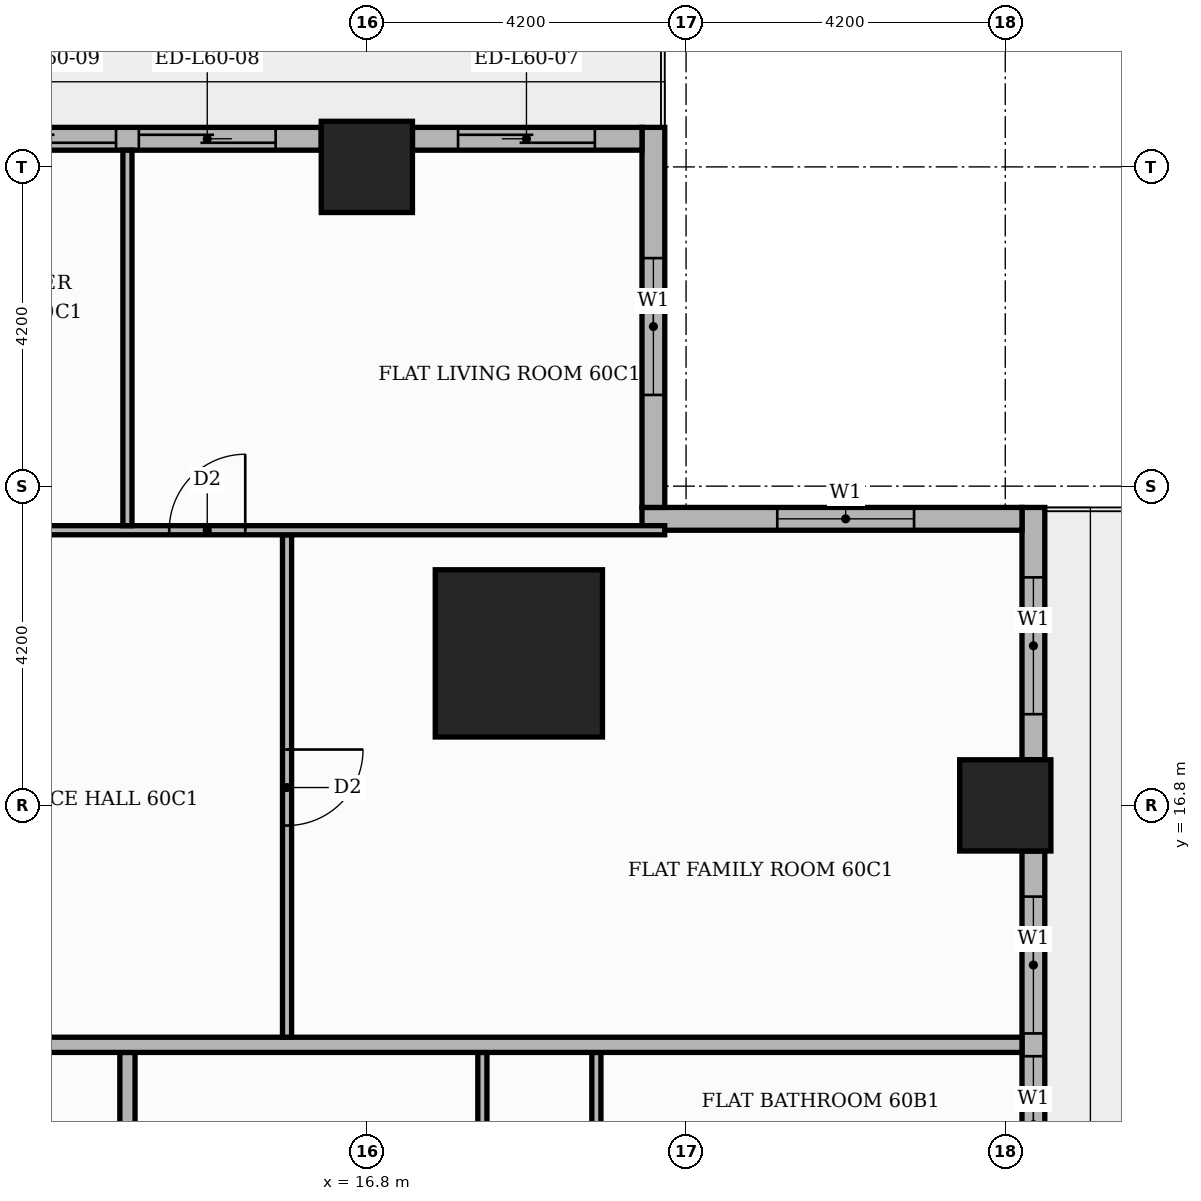
"""IFC4 building model, lengths in metres.
Left out: names, types, materials, properties, quantities, classifications, styles, units other than length and angle.
Written with IfcOpenShell. Run it as: python <this file> out.ifc"""

import sys

from ifc_helpers import new_model, si_unit, direction, frame, frame_2d, origin, origin_2d, place, context, subcontext, project, spatial, rectangle, extrude, element, fill, save


model = new_model("IFC4")
c1 = context("Model", 3, precision=1e-05, world=origin(), true_north=direction((0.0, 1.0)))
c2 = subcontext(c1, "Body", "Model", "MODEL_VIEW")
j1 = project(units=[si_unit("LENGTHUNIT", "METRE"), si_unit("PLANEANGLEUNIT", "RADIAN")], contexts=[c1])
p1 = place(None, origin())
s1 = spatial("IfcSite", under=j1, at=p1, CompositionType="ELEMENT")
p2 = place(p1, origin())
s2 = spatial("IfcBuilding", under=s1, at=p2, CompositionType="ELEMENT")
p3 = place(p2, frame((0.0, 0.0, 252.3)))
s3 = spatial("IfcBuildingStorey", under=s2, at=p3, CompositionType="ELEMENT", Elevation=252.3)
p4 = place(p3, frame((18.8, 18.8, 0.0), z_axis=(0.0, 0.0, 1.0), x_axis=(1.0, 0.0, 0.0)))
e1 = element("IfcColumn", 1, at=p4, inside=s3, PredefinedType="COLUMN", context=c2, shape_type="SweptSolid", body=[
    extrude(rectangle(XDim=2.2, YDim=2.2, at=origin_2d()), origin(), (0.0, 0.0, 1.0), 3.9),
])
for number, where, z_axis, x_axis in (
    (2, (25.2, 16.8, 0.0), (0.0, 0.0, 1.0), (1.0, 0.0, 0.0)),
    (3, (16.8, 25.2, 0.0), (0.0, 0.0, 1.0), (1.0, 0.0, 0.0)),
):
    element("IfcColumn", number, at=place(p3, frame(where, z_axis=z_axis, x_axis=x_axis)), inside=s3, PredefinedType="COLUMN", context=c2, shape_type="SweptSolid", body=[
        extrude(rectangle(XDim=1.2, YDim=1.2, at=origin_2d()), origin(), (0.0, 0.0, 1.0), 3.9),
    ])
p5 = place(p3, frame((25.57, 9.0, 0.0), z_axis=(0.0, 0.0, 1.0), x_axis=(0.0, 1.0, 0.0)))
e4 = element("IfcWall", 4, at=p5, inside=s3, PredefinedType="STANDARD", context=c2, shape_type="SweptSolid", body=[
    extrude(rectangle(XDim=7.2, YDim=0.3, at=frame_2d((3.6, 0.0))), origin(), (0.0, 0.0, 1.0), 3.48),
])
p6 = place(p5, frame((0.6, 0.0, 0.9)))
e5 = element("IfcOpeningElement", 5, at=p6, cuts=e4, PredefinedType="OPENING", context=c2, shape_type="SweptSolid", body=[
    extrude(rectangle(XDim=1.8, YDim=2.1, at=frame_2d((0.9, 1.05))), frame((0.0, 0.16, 0.0), z_axis=(0.0, -1.0, 0.0), x_axis=(1.0, 0.0, 0.0)), (0.0, 0.0, 1.0), 0.32),
])
p7 = place(p5, frame((2.7, 0.0, 0.9)))
e6 = element("IfcOpeningElement", 6, at=p7, cuts=e4, PredefinedType="OPENING", context=c2, shape_type="SweptSolid", body=[
    extrude(rectangle(XDim=1.8, YDim=2.1, at=frame_2d((0.9, 1.05))), frame((0.0, 0.16, 0.0), z_axis=(0.0, -1.0, 0.0), x_axis=(1.0, 0.0, 0.0)), (0.0, 0.0, 1.0), 0.32),
])
p8 = place(p5, frame((4.8, 0.0, 0.9)))
e7 = element("IfcOpeningElement", 7, at=p8, cuts=e4, PredefinedType="OPENING", context=c2, shape_type="SweptSolid", body=[
    extrude(rectangle(XDim=1.8, YDim=2.1, at=frame_2d((0.9, 1.05))), frame((0.0, 0.16, 0.0), z_axis=(0.0, -1.0, 0.0), x_axis=(1.0, 0.0, 0.0)), (0.0, 0.0, 1.0), 0.32),
])
p9 = place(p3, frame((25.57, 17.4, 0.0), z_axis=(0.0, 0.0, 1.0), x_axis=(0.0, 1.0, 0.0)))
e8 = element("IfcWall", 8, at=p9, inside=s3, PredefinedType="STANDARD", context=c2, shape_type="SweptSolid", body=[
    extrude(rectangle(XDim=3.32, YDim=0.3, at=frame_2d((1.66, 0.0))), origin(), (0.0, 0.0, 1.0), 3.48),
])
p10 = place(p9, frame((0.6, 0.0, 0.9)))
e9 = element("IfcOpeningElement", 9, at=p10, cuts=e8, PredefinedType="OPENING", context=c2, shape_type="SweptSolid", body=[
    extrude(rectangle(XDim=1.8, YDim=2.1, at=frame_2d((0.9, 1.05))), frame((0.0, 0.16, 0.0), z_axis=(0.0, -1.0, 0.0), x_axis=(1.0, 0.0, 0.0)), (0.0, 0.0, 1.0), 0.32),
])
p11 = place(p3, frame((25.42, 20.57, 0.0), z_axis=(0.0, 0.0, 1.0), x_axis=(-1.0, 0.0, 0.0)))
e10 = element("IfcWall", 10, at=p11, inside=s3, PredefinedType="STANDARD", context=c2, shape_type="SweptSolid", body=[
    extrude(rectangle(XDim=5.0, YDim=0.3, at=frame_2d((2.5, 0.0))), origin(), (0.0, 0.0, 1.0), 3.48),
])
p12 = place(p11, frame((1.42, 0.0, 0.9)))
e11 = element("IfcOpeningElement", 11, at=p12, cuts=e10, PredefinedType="OPENING", context=c2, shape_type="SweptSolid", body=[
    extrude(rectangle(XDim=1.8, YDim=2.1, at=frame_2d((0.9, 1.05))), frame((0.0, 0.16, 0.0), z_axis=(0.0, -1.0, 0.0), x_axis=(1.0, 0.0, 0.0)), (0.0, 0.0, 1.0), 0.32),
])
p13 = place(p3, frame((20.57, 20.72, 0.0), z_axis=(0.0, 0.0, 1.0), x_axis=(0.0, 1.0, 0.0)))
e12 = element("IfcWall", 12, at=p13, inside=s3, PredefinedType="STANDARD", context=c2, shape_type="SweptSolid", body=[
    extrude(rectangle(XDim=5.0, YDim=0.3, at=frame_2d((2.5, 0.0))), origin(), (0.0, 0.0, 1.0), 3.48),
])
p14 = place(p13, frame((1.48, 0.0, 0.9)))
e13 = element("IfcOpeningElement", 13, at=p14, cuts=e12, PredefinedType="OPENING", context=c2, shape_type="SweptSolid", body=[
    extrude(rectangle(XDim=1.8, YDim=2.1, at=frame_2d((0.9, 1.05))), frame((0.0, 0.16, 0.0), z_axis=(0.0, -1.0, 0.0), x_axis=(1.0, 0.0, 0.0)), (0.0, 0.0, 1.0), 0.32),
])
p15 = place(p3, frame((20.42, 25.57, 0.0), z_axis=(0.0, 0.0, 1.0), x_axis=(-1.0, 0.0, 0.0)))
e14 = element("IfcWall", 14, at=p15, inside=s3, PredefinedType="STANDARD", context=c2, shape_type="SweptSolid", body=[
    extrude(rectangle(XDim=3.02, YDim=0.3, at=frame_2d((1.51, 0.0))), origin(), (0.0, 0.0, 1.0), 3.48),
])
p16 = place(p15, frame((0.62, 0.0, 0.0)))
e15 = element("IfcOpeningElement", 15, at=p16, cuts=e14, PredefinedType="OPENING", context=c2, shape_type="SweptSolid", body=[
    extrude(rectangle(XDim=1.8, YDim=2.4, at=frame_2d((0.9, 1.2))), frame((0.0, 0.16, 0.0), z_axis=(0.0, -1.0, 0.0), x_axis=(1.0, 0.0, 0.0)), (0.0, 0.0, 1.0), 0.32),
])
p17 = place(p3, frame((16.2, 25.57, 0.0), z_axis=(0.0, 0.0, 1.0), x_axis=(-1.0, 0.0, 0.0)))
e16 = element("IfcWall", 16, at=p17, inside=s3, PredefinedType="STANDARD", context=c2, shape_type="SweptSolid", body=[
    extrude(rectangle(XDim=7.2, YDim=0.3, at=frame_2d((3.6, 0.0))), origin(), (0.0, 0.0, 1.0), 3.48),
])
p18 = place(p17, frame((0.6, 0.0, 0.0)))
e17 = element("IfcOpeningElement", 17, at=p18, cuts=e16, PredefinedType="OPENING", context=c2, shape_type="SweptSolid", body=[
    extrude(rectangle(XDim=1.8, YDim=2.4, at=frame_2d((0.9, 1.2))), frame((0.0, 0.16, 0.0), z_axis=(0.0, -1.0, 0.0), x_axis=(1.0, 0.0, 0.0)), (0.0, 0.0, 1.0), 0.32),
])
p19 = place(p17, frame((2.7, 0.0, 0.0)))
e18 = element("IfcOpeningElement", 18, at=p19, cuts=e16, PredefinedType="OPENING", context=c2, shape_type="SweptSolid", body=[
    extrude(rectangle(XDim=1.8, YDim=2.4, at=frame_2d((0.9, 1.2))), frame((0.0, 0.16, 0.0), z_axis=(0.0, -1.0, 0.0), x_axis=(1.0, 0.0, 0.0)), (0.0, 0.0, 1.0), 0.32),
])
p20 = place(p17, frame((4.8, 0.0, 0.9)))
e19 = element("IfcOpeningElement", 19, at=p20, cuts=e16, PredefinedType="OPENING", context=c2, shape_type="SweptSolid", body=[
    extrude(rectangle(XDim=1.8, YDim=2.1, at=frame_2d((0.9, 1.05))), frame((0.0, 0.16, 0.0), z_axis=(0.0, -1.0, 0.0), x_axis=(1.0, 0.0, 0.0)), (0.0, 0.0, 1.0), 0.32),
])
p21 = place(p3, frame((18.32, 9.66, 0.0), z_axis=(0.0, 0.0, 1.0), x_axis=(0.0, 1.0, 0.0)))
e20 = element("IfcWall", 20, at=p21, inside=s3, PredefinedType="PARTITIONING", context=c2, shape_type="SweptSolid", body=[
    extrude(rectangle(XDim=3.89, YDim=0.12, at=frame_2d((1.945, 0.0))), origin(), (0.0, 0.0, 1.0), 3.48),
])
p22 = place(p21, frame((1.515, 0.0, 0.0)))
e21 = element("IfcOpeningElement", 21, at=p22, cuts=e20, PredefinedType="OPENING", context=c2, shape_type="SweptSolid", body=[
    extrude(rectangle(XDim=0.9, YDim=2.1, at=frame_2d((0.45, 1.05))), frame((0.0, 0.07, 0.0), z_axis=(0.0, -1.0, 0.0), x_axis=(1.0, 0.0, 0.0)), (0.0, 0.0, 1.0), 0.14),
])
p23 = place(p3, frame((13.65, 11.1, 0.0), z_axis=(0.0, 0.0, 1.0), x_axis=(0.0, 1.0, 0.0)))
e22 = element("IfcWall", 22, at=p23, inside=s3, PredefinedType="PARTITIONING", context=c2, shape_type="SweptSolid", body=[
    extrude(rectangle(XDim=2.45, YDim=0.2, at=frame_2d((1.225, 0.0))), origin(), (0.0, 0.0, 1.0), 3.48),
])
p24 = place(p3, frame((19.82, 11.61, 0.0), z_axis=(0.0, 0.0, 1.0), x_axis=(0.0, 1.0, 0.0)))
e23 = element("IfcWall", 23, at=p24, inside=s3, PredefinedType="PARTITIONING", context=c2, shape_type="SweptSolid", body=[
    extrude(rectangle(XDim=1.94, YDim=0.12, at=frame_2d((0.97, 0.0))), origin(), (0.0, 0.0, 1.0), 3.48),
])
p25 = place(p3, frame((-13.65, 13.65, 0.0), z_axis=(0.0, 0.0, 1.0), x_axis=(1.0, 0.0, 0.0)))
e24 = element("IfcWall", 24, at=p25, inside=s3, PredefinedType="PARTITIONING", context=c2, shape_type="SweptSolid", body=[
    extrude(rectangle(XDim=39.07, YDim=0.2, at=frame_2d((19.535, 0.0))), origin(), (0.0, 0.0, 1.0), 3.48),
])
p26 = place(p25, frame((24.65, 0.0, 0.0)))
e25 = element("IfcOpeningElement", 25, at=p26, cuts=e24, PredefinedType="OPENING", context=c2, shape_type="SweptSolid", body=[
    extrude(rectangle(XDim=1.1, YDim=2.4, at=frame_2d((0.55, 1.2))), frame((0.0, 0.11, 0.0), z_axis=(0.0, -1.0, 0.0), x_axis=(1.0, 0.0, 0.0)), (0.0, 0.0, 1.0), 0.22),
])
p27 = place(p25, frame((14.15, 0.0, 0.0)))
e26 = element("IfcOpeningElement", 26, at=p27, cuts=e24, PredefinedType="OPENING", context=c2, shape_type="SweptSolid", body=[
    extrude(rectangle(XDim=1.1, YDim=2.4, at=frame_2d((0.55, 1.2))), frame((0.0, 0.11, 0.0), z_axis=(0.0, -1.0, 0.0), x_axis=(1.0, 0.0, 0.0)), (0.0, 0.0, 1.0), 0.22),
])
p28 = place(p3, frame((15.75, 13.75, 0.0), z_axis=(0.0, 0.0, 1.0), x_axis=(0.0, 1.0, 0.0)))
e27 = element("IfcWall", 27, at=p28, inside=s3, PredefinedType="PARTITIONING", context=c2, shape_type="SweptSolid", body=[
    extrude(rectangle(XDim=6.61, YDim=0.12, at=frame_2d((3.305, 0.0))), origin(), (0.0, 0.0, 1.0), 3.48),
])
p29 = place(p28, frame((2.785, 0.0, 0.0)))
e28 = element("IfcOpeningElement", 28, at=p29, cuts=e27, PredefinedType="OPENING", context=c2, shape_type="SweptSolid", body=[
    extrude(rectangle(XDim=1.0, YDim=2.1, at=frame_2d((0.5, 1.05))), frame((0.0, 0.07, 0.0), z_axis=(0.0, -1.0, 0.0), x_axis=(1.0, 0.0, 0.0)), (0.0, 0.0, 1.0), 0.14),
])
p30 = place(p3, frame((5.35, 20.42, 0.0), z_axis=(0.0, 0.0, 1.0), x_axis=(1.0, 0.0, 0.0)))
e29 = element("IfcWall", 29, at=p30, inside=s3, PredefinedType="PARTITIONING", context=c2, shape_type="SweptSolid", body=[
    extrude(rectangle(XDim=15.369, YDim=0.12, at=frame_2d((7.685, 0.0))), origin(), (0.0, 0.0, 1.0), 3.48),
])
p31 = place(p30, frame((8.85, 0.0, 0.0)))
e30 = element("IfcOpeningElement", 30, at=p31, cuts=e29, PredefinedType="OPENING", context=c2, shape_type="SweptSolid", body=[
    extrude(rectangle(XDim=1.0, YDim=2.1, at=frame_2d((0.5, 1.05))), frame((0.0, 0.07, 0.0), z_axis=(0.0, -1.0, 0.0), x_axis=(1.0, 0.0, 0.0)), (0.0, 0.0, 1.0), 0.14),
])
p32 = place(p30, frame((5.75, 0.0, 0.0)))
e31 = element("IfcOpeningElement", 31, at=p32, cuts=e29, PredefinedType="OPENING", context=c2, shape_type="SweptSolid", body=[
    extrude(rectangle(XDim=0.9, YDim=2.1, at=frame_2d((0.45, 1.05))), frame((0.0, 0.07, 0.0), z_axis=(0.0, -1.0, 0.0), x_axis=(1.0, 0.0, 0.0)), (0.0, 0.0, 1.0), 0.14),
])
p33 = place(p3, frame((13.65, 20.48, 0.0), z_axis=(0.0, 0.0, 1.0), x_axis=(0.0, 1.0, 0.0)))
e32 = element("IfcWall", 32, at=p33, inside=s3, PredefinedType="PARTITIONING", context=c2, shape_type="SweptSolid", body=[
    extrude(rectangle(XDim=4.94, YDim=0.12, at=frame_2d((2.47, 0.0))), origin(), (0.0, 0.0, 1.0), 3.48),
])
p34 = place(p7, origin())
e33 = element("IfcWindow", 33, at=p34, inside=s3, PartitioningType="SINGLE_PANEL", PredefinedType="WINDOW", context=c2, shape_type="SweptSolid", body=[
    extrude(rectangle(XDim=1.8, YDim=2.1, at=frame_2d((0.9, 1.05))), frame((0.0, 0.03, 0.0), z_axis=(0.0, -1.0, 0.0), x_axis=(1.0, 0.0, 0.0)), (0.0, 0.0, 1.0), 0.06),
])
fill(e6, e33)
p35 = place(p8, origin())
e34 = element("IfcWindow", 34, at=p35, inside=s3, PartitioningType="SINGLE_PANEL", PredefinedType="WINDOW", context=c2, shape_type="SweptSolid", body=[
    extrude(rectangle(XDim=1.8, YDim=2.1, at=frame_2d((0.9, 1.05))), frame((0.0, 0.03, 0.0), z_axis=(0.0, -1.0, 0.0), x_axis=(1.0, 0.0, 0.0)), (0.0, 0.0, 1.0), 0.06),
])
fill(e7, e34)
p36 = place(p10, origin())
e35 = element("IfcWindow", 35, at=p36, inside=s3, PartitioningType="SINGLE_PANEL", PredefinedType="WINDOW", context=c2, shape_type="SweptSolid", body=[
    extrude(rectangle(XDim=1.8, YDim=2.1, at=frame_2d((0.9, 1.05))), frame((0.0, 0.03, 0.0), z_axis=(0.0, -1.0, 0.0), x_axis=(1.0, 0.0, 0.0)), (0.0, 0.0, 1.0), 0.06),
])
fill(e9, e35)
p37 = place(p12, origin())
e36 = element("IfcWindow", 36, at=p37, inside=s3, PartitioningType="SINGLE_PANEL", PredefinedType="WINDOW", context=c2, shape_type="SweptSolid", body=[
    extrude(rectangle(XDim=1.8, YDim=2.1, at=frame_2d((0.9, 1.05))), frame((0.0, 0.03, 0.0), z_axis=(0.0, -1.0, 0.0), x_axis=(1.0, 0.0, 0.0)), (0.0, 0.0, 1.0), 0.06),
])
fill(e11, e36)
p38 = place(p14, origin())
e37 = element("IfcWindow", 37, at=p38, inside=s3, PartitioningType="SINGLE_PANEL", PredefinedType="WINDOW", context=c2, shape_type="SweptSolid", body=[
    extrude(rectangle(XDim=1.8, YDim=2.1, at=frame_2d((0.9, 1.05))), frame((0.0, 0.03, 0.0), z_axis=(0.0, -1.0, 0.0), x_axis=(1.0, 0.0, 0.0)), (0.0, 0.0, 1.0), 0.06),
])
fill(e13, e37)
p39 = place(p16, origin())
e38 = element("IfcDoor", 38, at=p39, inside=s3, OperationType="SLIDING_TO_RIGHT", PredefinedType="DOOR", context=c2, shape_type="SweptSolid", body=[
    extrude(rectangle(XDim=1.8, YDim=2.4, at=frame_2d((0.9, 1.2))), frame((0.0, 0.025, 0.0), z_axis=(0.0, -1.0, 0.0), x_axis=(1.0, 0.0, 0.0)), (0.0, 0.0, 1.0), 0.05),
])
fill(e15, e38)
p40 = place(p18, origin())
e39 = element("IfcDoor", 39, at=p40, inside=s3, OperationType="SLIDING_TO_LEFT", PredefinedType="DOOR", context=c2, shape_type="SweptSolid", body=[
    extrude(rectangle(XDim=1.8, YDim=2.4, at=frame_2d((0.9, 1.2))), frame((0.0, 0.025, 0.0), z_axis=(0.0, -1.0, 0.0), x_axis=(1.0, 0.0, 0.0)), (0.0, 0.0, 1.0), 0.05),
])
fill(e17, e39)
p41 = place(p19, origin())
e40 = element("IfcDoor", 40, at=p41, inside=s3, OperationType="SLIDING_TO_RIGHT", PredefinedType="DOOR", context=c2, shape_type="SweptSolid", body=[
    extrude(rectangle(XDim=1.8, YDim=2.4, at=frame_2d((0.9, 1.2))), frame((0.0, 0.025, 0.0), z_axis=(0.0, -1.0, 0.0), x_axis=(1.0, 0.0, 0.0)), (0.0, 0.0, 1.0), 0.05),
])
fill(e18, e40)
p42 = place(p29, frame((1.0, 0.0, 0.0), z_axis=(0.0, 0.0, 1.0), x_axis=(-1.0, 0.0, 0.0)))
e41 = element("IfcDoor", 41, at=p42, inside=s3, OperationType="SINGLE_SWING_RIGHT", PredefinedType="DOOR", context=c2, shape_type="SweptSolid", body=[
    extrude(rectangle(XDim=1.0, YDim=2.1, at=frame_2d((0.5, 1.05))), frame((0.0, 0.025, 0.0), z_axis=(0.0, -1.0, 0.0), x_axis=(1.0, 0.0, 0.0)), (0.0, 0.0, 1.0), 0.05),
])
fill(e28, e41)
p43 = place(p31, origin())
e42 = element("IfcDoor", 42, at=p43, inside=s3, OperationType="SINGLE_SWING_RIGHT", PredefinedType="DOOR", context=c2, shape_type="SweptSolid", body=[
    extrude(rectangle(XDim=1.0, YDim=2.1, at=frame_2d((0.5, 1.05))), frame((0.0, 0.025, 0.0), z_axis=(0.0, -1.0, 0.0), x_axis=(1.0, 0.0, 0.0)), (0.0, 0.0, 1.0), 0.05),
])
fill(e30, e42)
save(model, sys.argv[1])
